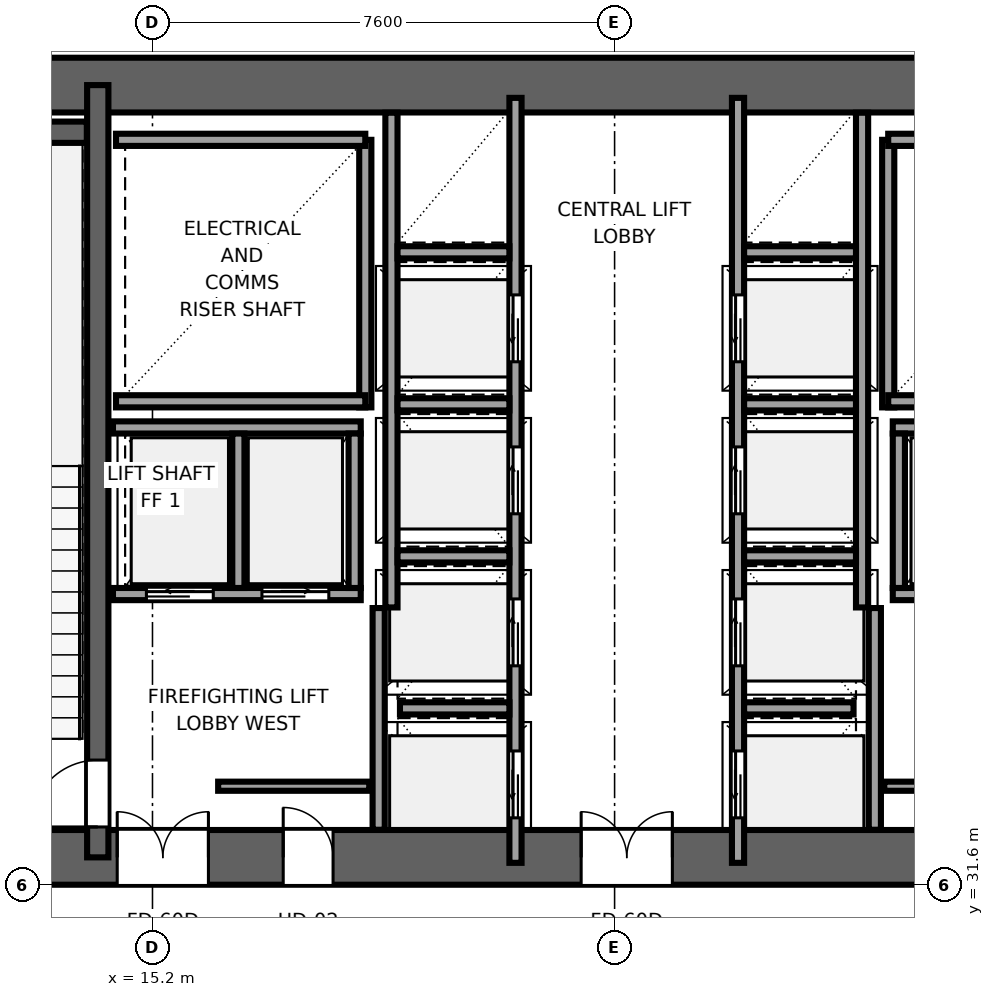
"""IFC4 building model, lengths in metres.
Left out: names, types, materials, properties, quantities, classifications, styles, units other than length and angle.
Written with IfcOpenShell. Run it as: python <this file> out.ifc"""

import sys

from ifc_helpers import new_model, si_unit, direction, frame, frame_2d, origin, place, context, subcontext, project, spatial, rectangle, extrude, source, transform, mapped, element, fill, save


model = new_model("IFC4")
c1 = context("Model", 3, precision=1e-05, world=origin(), true_north=direction((0.0, 1.0)))
c2 = subcontext(c1, "Body", "Model", "MODEL_VIEW")
j1 = project(units=[si_unit("LENGTHUNIT", "METRE"), si_unit("PLANEANGLEUNIT", "RADIAN")], contexts=[c1])
p1 = place(None, origin())
s1 = spatial("IfcSite", under=j1, at=p1, CompositionType="ELEMENT")
p2 = place(p1, origin())
s2 = spatial("IfcBuilding", under=s1, at=p2, CompositionType="ELEMENT")
p3 = place(p2, frame((0.0, 0.0, 26.8)))
s3 = spatial("IfcBuildingStorey", under=s2, at=p3, CompositionType="ELEMENT", Elevation=26.8)
p4 = place(p3, frame((9.6, 32.05, 0.0), z_axis=(0.0, 0.0, 1.0), x_axis=(1.0, 0.0, 0.0)))
e1 = element("IfcWall", 1, at=p4, inside=s3, PredefinedType="SHEAR", context=c2, shape_type="SweptSolid", body=[
    extrude(rectangle(XDim=26.8, YDim=0.9, at=frame_2d((13.4, 0.0))), origin(), (0.0, 0.0, 1.0), 5.2),
])
p5 = place(p4, frame((6.52, 0.0, 0.0), z_axis=(0.0, 0.0, 1.0), x_axis=(-1.0, 0.0, 0.0)))
e2 = element("IfcOpeningElement", 2, at=p5, cuts=e1, PredefinedType="OPENING", context=c2, shape_type="SweptSolid", body=[
    extrude(rectangle(XDim=1.5, YDim=2.04, at=frame_2d((0.75, 1.02))), frame((0.0, 0.46, 0.0), z_axis=(0.0, -1.0, 0.0), x_axis=(1.0, 0.0, 0.0)), (0.0, 0.0, 1.0), 0.92),
])
p6 = place(p4, frame((14.15, 0.0, 0.0), z_axis=(0.0, 0.0, 1.0), x_axis=(-1.0, 0.0, 0.0)))
e3 = element("IfcOpeningElement", 3, at=p6, cuts=e1, PredefinedType="OPENING", context=c2, shape_type="SweptSolid", body=[
    extrude(rectangle(XDim=1.5, YDim=2.04, at=frame_2d((0.75, 1.02))), frame((0.0, 0.46, 0.0), z_axis=(0.0, -1.0, 0.0), x_axis=(1.0, 0.0, 0.0)), (0.0, 0.0, 1.0), 0.92),
])
p7 = place(p4, frame((21.78, 0.0, 0.0), z_axis=(0.0, 0.0, 1.0), x_axis=(-1.0, 0.0, 0.0)))
e4 = element("IfcOpeningElement", 4, at=p7, cuts=e1, PredefinedType="OPENING", context=c2, shape_type="SweptSolid", body=[
    extrude(rectangle(XDim=1.5, YDim=2.04, at=frame_2d((0.75, 1.02))), frame((0.0, 0.46, 0.0), z_axis=(0.0, -1.0, 0.0), x_axis=(1.0, 0.0, 0.0)), (0.0, 0.0, 1.0), 0.92),
])
p8 = place(p4, frame((8.57, 0.0, 0.0), z_axis=(0.0, 0.0, 1.0), x_axis=(-1.0, 0.0, 0.0)))
e5 = element("IfcOpeningElement", 5, at=p8, cuts=e1, PredefinedType="OPENING", context=c2, shape_type="SweptSolid", body=[
    extrude(rectangle(XDim=0.82, YDim=2.01, at=frame_2d((0.41, 1.005))), frame((0.0, 0.46, 0.0), z_axis=(0.0, -1.0, 0.0), x_axis=(1.0, 0.0, 0.0)), (0.0, 0.0, 1.0), 0.92),
])
p9 = place(p4, frame((19.07, 0.0, 0.0), z_axis=(0.0, 0.0, 1.0), x_axis=(-1.0, 0.0, 0.0)))
e6 = element("IfcOpeningElement", 6, at=p9, cuts=e1, PredefinedType="OPENING", context=c2, shape_type="SweptSolid", body=[
    extrude(rectangle(XDim=0.82, YDim=2.01, at=frame_2d((0.41, 1.005))), frame((0.0, 0.46, 0.0), z_axis=(0.0, -1.0, 0.0), x_axis=(1.0, 0.0, 0.0)), (0.0, 0.0, 1.0), 0.92),
])
p10 = place(p3, frame((9.6, 44.75, 0.0), z_axis=(0.0, 0.0, 1.0), x_axis=(1.0, 0.0, 0.0)))
e7 = element("IfcWall", 7, at=p10, inside=s3, PredefinedType="SHEAR", context=c2, shape_type="SweptSolid", body=[
    extrude(rectangle(XDim=26.8, YDim=0.9, at=frame_2d((13.4, 0.0))), origin(), (0.0, 0.0, 1.0), 5.2),
])
p11 = place(p3, frame((14.3, 32.05, 0.0), z_axis=(0.0, 0.0, 1.0), x_axis=(0.0, 1.0, 0.0)))
e8 = element("IfcWall", 8, at=p11, inside=s3, PredefinedType="SHEAR", context=c2, shape_type="SweptSolid", body=[
    extrude(rectangle(XDim=12.7, YDim=0.35, at=frame_2d((6.35, 0.0))), origin(), (0.0, 0.0, 1.0), 5.2),
])
p12 = place(p11, frame((0.5, 0.0, 0.0)))
e9 = element("IfcOpeningElement", 9, at=p12, cuts=e8, PredefinedType="OPENING", context=c2, shape_type="SweptSolid", body=[
    extrude(rectangle(XDim=1.1, YDim=2.12, at=frame_2d((0.55, 1.06))), frame((0.0, 0.185, 0.0), z_axis=(0.0, -1.0, 0.0), x_axis=(1.0, 0.0, 0.0)), (0.0, 0.0, 1.0), 0.37),
])
p13 = place(p3, frame((10.52, 43.975, 0.0), z_axis=(0.0, 0.0, 1.0), x_axis=(1.0, 0.0, 0.0)))
e10 = element("IfcWall", 10, at=p13, inside=s3, PredefinedType="SHEAR", context=c2, shape_type="SweptSolid", body=[
    extrude(rectangle(XDim=3.6, YDim=0.35, at=frame_2d((1.8, 0.0))), origin(), (0.0, 0.0, 1.0), 5.2),
])
p14 = place(p3, frame((18.7, 39.45, 0.0), z_axis=(0.0, 0.0, 1.0), x_axis=(0.0, 1.0, 0.0)))
e11 = element("IfcWall", 11, at=p14, inside=s3, PredefinedType="SOLIDWALL", context=c2, shape_type="SweptSolid", body=[
    extrude(rectangle(XDim=4.4, YDim=0.2, at=frame_2d((2.2, 0.0))), origin(), (0.0, 0.0, 1.0), 4.94),
])
for number, where, z_axis, x_axis in (
    (12, (14.6, 39.55, 0.0), (0.0, 0.0, 1.0), (1.0, 0.0, 0.0)),
    (13, (14.6, 43.85, 0.0), (0.0, 0.0, 1.0), (1.0, 0.0, 0.0)),
):
    element("IfcWall", number, at=place(p3, frame(where, z_axis=z_axis, x_axis=x_axis)), inside=s3, PredefinedType="SOLIDWALL", context=c2, shape_type="SweptSolid", body=[
        extrude(rectangle(XDim=4.1, YDim=0.2, at=frame_2d((2.05, 0.0))), origin(), (0.0, 0.0, 1.0), 4.94),
    ])
p15 = place(p3, frame((27.3, 39.45, 0.0), z_axis=(0.0, 0.0, 1.0), x_axis=(0.0, 1.0, 0.0)))
e14 = element("IfcWall", 14, at=p15, inside=s3, PredefinedType="SOLIDWALL", context=c2, shape_type="SweptSolid", body=[
    extrude(rectangle(XDim=4.4, YDim=0.2, at=frame_2d((2.2, 0.0))), origin(), (0.0, 0.0, 1.0), 4.94),
])
for number, where, z_axis, x_axis in (
    (15, (27.3, 39.55, 0.0), (0.0, 0.0, 1.0), (1.0, 0.0, 0.0)),
    (16, (27.3, 43.85, 0.0), (0.0, 0.0, 1.0), (1.0, 0.0, 0.0)),
):
    element("IfcWall", number, at=place(p3, frame(where, z_axis=z_axis, x_axis=x_axis)), inside=s3, PredefinedType="SOLIDWALL", context=c2, shape_type="SweptSolid", body=[
        extrude(rectangle(XDim=4.1, YDim=0.2, at=frame_2d((2.05, 0.0))), origin(), (0.0, 0.0, 1.0), 4.94),
    ])
for number, where, z_axis, x_axis in (
    (17, (18.92, 32.504, 0.0), (0.0, 0.0, 1.0), (0.0, 1.0, 0.0)),
    (18, (27.08, 32.504, 0.0), (0.0, 0.0, 1.0), (0.0, 1.0, 0.0)),
):
    element("IfcWall", number, at=place(p3, frame(where, z_axis=z_axis, x_axis=x_axis)), inside=s3, PredefinedType="SOLIDWALL", context=c2, shape_type="SweptSolid", body=[
        extrude(rectangle(XDim=3.646, YDim=0.2, at=frame_2d((1.823, 0.0))), origin(), (0.0, 0.0, 1.0), 4.94),
    ])
p16 = place(p3, frame((21.17, 31.96, 0.0), z_axis=(0.0, 0.0, 1.0), x_axis=(0.0, 1.0, 0.0)))
e19 = element("IfcWall", 19, at=p16, inside=s3, PredefinedType="SOLIDWALL", context=c2, shape_type="SweptSolid", body=[
    extrude(rectangle(XDim=12.58, YDim=0.2, at=frame_2d((6.29, 0.0))), origin(), (0.0, 0.0, 1.0), 4.94),
])
p17 = place(p16, frame((0.74, 0.0, 0.0)))
e20 = element("IfcOpeningElement", 20, at=p17, cuts=e19, PredefinedType="OPENING", context=c2, shape_type="SweptSolid", body=[
    extrude(rectangle(XDim=1.1, YDim=2.12, at=frame_2d((0.55, 1.06))), frame((0.0, 0.11, 0.0), z_axis=(0.0, -1.0, 0.0), x_axis=(1.0, 0.0, 0.0)), (0.0, 0.0, 1.0), 0.22),
])
p18 = place(p16, frame((3.24, 0.0, 0.0)))
e21 = element("IfcOpeningElement", 21, at=p18, cuts=e19, PredefinedType="OPENING", context=c2, shape_type="SweptSolid", body=[
    extrude(rectangle(XDim=1.1, YDim=2.12, at=frame_2d((0.55, 1.06))), frame((0.0, 0.11, 0.0), z_axis=(0.0, -1.0, 0.0), x_axis=(1.0, 0.0, 0.0)), (0.0, 0.0, 1.0), 0.22),
])
p19 = place(p16, frame((5.74, 0.0, 0.0)))
e22 = element("IfcOpeningElement", 22, at=p19, cuts=e19, PredefinedType="OPENING", context=c2, shape_type="SweptSolid", body=[
    extrude(rectangle(XDim=1.1, YDim=2.12, at=frame_2d((0.55, 1.06))), frame((0.0, 0.11, 0.0), z_axis=(0.0, -1.0, 0.0), x_axis=(1.0, 0.0, 0.0)), (0.0, 0.0, 1.0), 0.22),
])
p20 = place(p16, frame((8.24, 0.0, 0.0)))
e23 = element("IfcOpeningElement", 23, at=p20, cuts=e19, PredefinedType="OPENING", context=c2, shape_type="SweptSolid", body=[
    extrude(rectangle(XDim=1.1, YDim=2.12, at=frame_2d((0.55, 1.06))), frame((0.0, 0.11, 0.0), z_axis=(0.0, -1.0, 0.0), x_axis=(1.0, 0.0, 0.0)), (0.0, 0.0, 1.0), 0.22),
])
p21 = place(p3, frame((19.13, 36.16, 0.0), z_axis=(0.0, 0.0, 1.0), x_axis=(0.0, 1.0, 0.0)))
e24 = element("IfcWall", 24, at=p21, inside=s3, PredefinedType="SOLIDWALL", context=c2, shape_type="SweptSolid", body=[
    extrude(rectangle(XDim=8.136, YDim=0.2, at=frame_2d((4.068, 0.0))), origin(), (0.0, 0.0, 1.0), 4.94),
])
p22 = place(p3, frame((19.27, 34.5, 0.0), z_axis=(0.0, 0.0, 1.0), x_axis=(1.0, 0.0, 0.0)))
e25 = element("IfcWall", 25, at=p22, inside=s3, PredefinedType="SOLIDWALL", context=c2, shape_type="SweptSolid", body=[
    extrude(rectangle(XDim=1.8, YDim=0.2, at=frame_2d((0.9, 0.0))), origin(), (0.0, 0.0, 1.0), 4.94),
])
for number, where, z_axis, x_axis in (
    (26, (19.23, 37.0, 0.0), (0.0, 0.0, 1.0), (1.0, 0.0, 0.0)),
    (27, (19.23, 39.5, 0.0), (0.0, 0.0, 1.0), (1.0, 0.0, 0.0)),
    (28, (19.23, 42.0, 0.0), (0.0, 0.0, 1.0), (1.0, 0.0, 0.0)),
):
    element("IfcWall", number, at=place(p3, frame(where, z_axis=z_axis, x_axis=x_axis)), inside=s3, PredefinedType="SOLIDWALL", context=c2, shape_type="SweptSolid", body=[
        extrude(rectangle(XDim=1.84, YDim=0.2, at=frame_2d((0.92, 0.0))), origin(), (0.0, 0.0, 1.0), 4.94),
    ])
p23 = place(p3, frame((27.375, 36.38, 0.0), z_axis=(0.0, 0.0, 1.0), x_axis=(1.0, 0.0, 0.0)))
e29 = element("IfcWall", 29, at=p23, inside=s3, PredefinedType="SOLIDWALL", context=c2, shape_type="SweptSolid", body=[
    extrude(rectangle(XDim=4.075, YDim=0.2, at=frame_2d((2.038, 0.0))), origin(), (0.0, 0.0, 1.0), 4.94),
])
p24 = place(p23, frame((0.525, 0.0, 0.0)))
e30 = element("IfcOpeningElement", 30, at=p24, cuts=e29, PredefinedType="OPENING", context=c2, shape_type="SweptSolid", body=[
    extrude(rectangle(XDim=1.1, YDim=2.12, at=frame_2d((0.55, 1.06))), frame((0.0, 0.11, 0.0), z_axis=(0.0, -1.0, 0.0), x_axis=(1.0, 0.0, 0.0)), (0.0, 0.0, 1.0), 0.22),
])
p25 = place(p23, frame((2.425, 0.0, 0.0)))
e31 = element("IfcOpeningElement", 31, at=p25, cuts=e29, PredefinedType="OPENING", context=c2, shape_type="SweptSolid", body=[
    extrude(rectangle(XDim=1.1, YDim=2.12, at=frame_2d((0.55, 1.06))), frame((0.0, 0.11, 0.0), z_axis=(0.0, -1.0, 0.0), x_axis=(1.0, 0.0, 0.0)), (0.0, 0.0, 1.0), 0.22),
])
p26 = place(p3, frame((27.375, 39.12, 0.0), z_axis=(0.0, 0.0, 1.0), x_axis=(1.0, 0.0, 0.0)))
e32 = element("IfcWall", 32, at=p26, inside=s3, PredefinedType="SOLIDWALL", context=c2, shape_type="SweptSolid", body=[
    extrude(rectangle(XDim=4.075, YDim=0.2, at=frame_2d((2.038, 0.0))), origin(), (0.0, 0.0, 1.0), 4.94),
])
p27 = place(p3, frame((27.475, 36.48, 0.0), z_axis=(0.0, 0.0, 1.0), x_axis=(0.0, 1.0, 0.0)))
e33 = element("IfcWall", 33, at=p27, inside=s3, PredefinedType="SOLIDWALL", context=c2, shape_type="SweptSolid", body=[
    extrude(rectangle(XDim=2.54, YDim=0.2, at=frame_2d((1.27, 0.0))), origin(), (0.0, 0.0, 1.0), 4.94),
])
p28 = place(p3, frame((14.55, 36.38, 0.0), z_axis=(0.0, 0.0, 1.0), x_axis=(1.0, 0.0, 0.0)))
e34 = element("IfcWall", 34, at=p28, inside=s3, PredefinedType="SOLIDWALL", context=c2, shape_type="SweptSolid", body=[
    extrude(rectangle(XDim=4.075, YDim=0.2, at=frame_2d((2.038, 0.0))), origin(), (0.0, 0.0, 1.0), 4.94),
])
p29 = place(p28, frame((0.55, 0.0, 0.0)))
e35 = element("IfcOpeningElement", 35, at=p29, cuts=e34, PredefinedType="OPENING", context=c2, shape_type="SweptSolid", body=[
    extrude(rectangle(XDim=1.1, YDim=2.12, at=frame_2d((0.55, 1.06))), frame((0.0, 0.11, 0.0), z_axis=(0.0, -1.0, 0.0), x_axis=(1.0, 0.0, 0.0)), (0.0, 0.0, 1.0), 0.22),
])
p30 = place(p28, frame((2.45, 0.0, 0.0)))
e36 = element("IfcOpeningElement", 36, at=p30, cuts=e34, PredefinedType="OPENING", context=c2, shape_type="SweptSolid", body=[
    extrude(rectangle(XDim=1.1, YDim=2.12, at=frame_2d((0.55, 1.06))), frame((0.0, 0.11, 0.0), z_axis=(0.0, -1.0, 0.0), x_axis=(1.0, 0.0, 0.0)), (0.0, 0.0, 1.0), 0.22),
])
p31 = place(p3, frame((14.55, 39.12, 0.0), z_axis=(0.0, 0.0, 1.0), x_axis=(1.0, 0.0, 0.0)))
e37 = element("IfcWall", 37, at=p31, inside=s3, PredefinedType="SOLIDWALL", context=c2, shape_type="SweptSolid", body=[
    extrude(rectangle(XDim=4.075, YDim=0.2, at=frame_2d((2.038, 0.0))), origin(), (0.0, 0.0, 1.0), 4.94),
])
for number, where, z_axis, x_axis in (
    (38, (18.525, 36.48, 0.0), (0.0, 0.0, 1.0), (0.0, 1.0, 0.0)),
    (39, (16.613, 36.48, 0.0), (0.0, 0.0, 1.0), (0.0, 1.0, 0.0)),
):
    element("IfcWall", number, at=place(p3, frame(where, z_axis=z_axis, x_axis=x_axis)), inside=s3, PredefinedType="SOLIDWALL", context=c2, shape_type="SweptSolid", body=[
        extrude(rectangle(XDim=2.54, YDim=0.2, at=frame_2d((1.27, 0.0))), origin(), (0.0, 0.0, 1.0), 4.94),
    ])
p32 = place(p3, frame((24.83, 31.96, 0.0), z_axis=(0.0, 0.0, 1.0), x_axis=(0.0, 1.0, 0.0)))
e40 = element("IfcWall", 40, at=p32, inside=s3, PredefinedType="SOLIDWALL", context=c2, shape_type="SweptSolid", body=[
    extrude(rectangle(XDim=12.58, YDim=0.2, at=frame_2d((6.29, 0.0))), origin(), (0.0, 0.0, 1.0), 4.94),
])
p33 = place(p32, frame((0.74, 0.0, 0.0)))
e41 = element("IfcOpeningElement", 41, at=p33, cuts=e40, PredefinedType="OPENING", context=c2, shape_type="SweptSolid", body=[
    extrude(rectangle(XDim=1.1, YDim=2.12, at=frame_2d((0.55, 1.06))), frame((0.0, 0.11, 0.0), z_axis=(0.0, -1.0, 0.0), x_axis=(1.0, 0.0, 0.0)), (0.0, 0.0, 1.0), 0.22),
])
p34 = place(p32, frame((3.24, 0.0, 0.0)))
e42 = element("IfcOpeningElement", 42, at=p34, cuts=e40, PredefinedType="OPENING", context=c2, shape_type="SweptSolid", body=[
    extrude(rectangle(XDim=1.1, YDim=2.12, at=frame_2d((0.55, 1.06))), frame((0.0, 0.11, 0.0), z_axis=(0.0, -1.0, 0.0), x_axis=(1.0, 0.0, 0.0)), (0.0, 0.0, 1.0), 0.22),
])
p35 = place(p32, frame((5.74, 0.0, 0.0)))
e43 = element("IfcOpeningElement", 43, at=p35, cuts=e40, PredefinedType="OPENING", context=c2, shape_type="SweptSolid", body=[
    extrude(rectangle(XDim=1.1, YDim=2.12, at=frame_2d((0.55, 1.06))), frame((0.0, 0.11, 0.0), z_axis=(0.0, -1.0, 0.0), x_axis=(1.0, 0.0, 0.0)), (0.0, 0.0, 1.0), 0.22),
])
p36 = place(p32, frame((8.24, 0.0, 0.0)))
e44 = element("IfcOpeningElement", 44, at=p36, cuts=e40, PredefinedType="OPENING", context=c2, shape_type="SweptSolid", body=[
    extrude(rectangle(XDim=1.1, YDim=2.12, at=frame_2d((0.55, 1.06))), frame((0.0, 0.11, 0.0), z_axis=(0.0, -1.0, 0.0), x_axis=(1.0, 0.0, 0.0)), (0.0, 0.0, 1.0), 0.22),
])
p37 = place(p3, frame((26.87, 36.16, 0.0), z_axis=(0.0, 0.0, 1.0), x_axis=(0.0, 1.0, 0.0)))
e45 = element("IfcWall", 45, at=p37, inside=s3, PredefinedType="SOLIDWALL", context=c2, shape_type="SweptSolid", body=[
    extrude(rectangle(XDim=8.136, YDim=0.2, at=frame_2d((4.068, 0.0))), origin(), (0.0, 0.0, 1.0), 4.94),
])
p38 = place(p3, frame((24.93, 34.5, 0.0), z_axis=(0.0, 0.0, 1.0), x_axis=(1.0, 0.0, 0.0)))
e46 = element("IfcWall", 46, at=p38, inside=s3, PredefinedType="SOLIDWALL", context=c2, shape_type="SweptSolid", body=[
    extrude(rectangle(XDim=1.8, YDim=0.2, at=frame_2d((0.9, 0.0))), origin(), (0.0, 0.0, 1.0), 4.94),
])
for number, where, z_axis, x_axis in (
    (47, (24.93, 37.0, 0.0), (0.0, 0.0, 1.0), (1.0, 0.0, 0.0)),
    (48, (24.93, 39.5, 0.0), (0.0, 0.0, 1.0), (1.0, 0.0, 0.0)),
    (49, (24.93, 42.0, 0.0), (0.0, 0.0, 1.0), (1.0, 0.0, 0.0)),
):
    element("IfcWall", number, at=place(p3, frame(where, z_axis=z_axis, x_axis=x_axis)), inside=s3, PredefinedType="SOLIDWALL", context=c2, shape_type="SweptSolid", body=[
        extrude(rectangle(XDim=1.84, YDim=0.2, at=frame_2d((0.92, 0.0))), origin(), (0.0, 0.0, 1.0), 4.94),
    ])
for number, where, z_axis, x_axis in (
    (50, (16.28, 33.22, 0.0), (0.0, 0.0, 1.0), (1.0, 0.0, 0.0)),
    (51, (27.235, 33.22, 0.0), (0.0, 0.0, 1.0), (1.0, 0.0, 0.0)),
):
    element("IfcWall", number, at=place(p3, frame(where, z_axis=z_axis, x_axis=x_axis)), inside=s3, PredefinedType="PARTITIONING", context=c2, shape_type="SweptSolid", body=[
        extrude(rectangle(XDim=2.485, YDim=0.15, at=frame_2d((1.242, 0.0))), origin(), (0.0, 0.0, 1.0), 4.94),
    ])
m1 = source(origin(), c2, "Body", "SweptSolid", [
    extrude(rectangle(XDim=1.1, YDim=2.12, at=frame_2d((0.55, 1.06))), frame((0.0, 0.025, 0.0), z_axis=(0.0, -1.0, 0.0), x_axis=(1.0, 0.0, 0.0)), (0.0, 0.0, 1.0), 0.05),
])
p39 = place(p12, origin())
e52 = element("IfcDoor", 52, at=p39, inside=s3, OperationType="SINGLE_SWING_LEFT", PredefinedType="DOOR", context=c2, shape_type="MappedRepresentation", body=[
    mapped(m1, transform((0.0, 0.0, 0.0), x_axis=(1.0, 0.0, 0.0), y_axis=(0.0, 1.0, 0.0), z_axis=(0.0, 0.0, 1.0), scale=1.0)),
])
fill(e9, e52)
m2 = source(origin(), c2, "Body", "SweptSolid", [
    extrude(rectangle(XDim=1.5, YDim=2.04, at=frame_2d((0.75, 1.02))), frame((0.0, 0.025, 0.0), z_axis=(0.0, -1.0, 0.0), x_axis=(1.0, 0.0, 0.0)), (0.0, 0.0, 1.0), 0.05),
])
p40 = place(p5, origin())
e53 = element("IfcDoor", 53, at=p40, inside=s3, OperationType="DOUBLE_DOOR_SINGLE_SWING", PredefinedType="DOOR", context=c2, shape_type="MappedRepresentation", body=[
    mapped(m2, transform((0.0, 0.0, 0.0), x_axis=(1.0, 0.0, 0.0), y_axis=(0.0, 1.0, 0.0), z_axis=(0.0, 0.0, 1.0), scale=1.0)),
])
fill(e2, e53)
p41 = place(p6, origin())
e54 = element("IfcDoor", 54, at=p41, inside=s3, OperationType="DOUBLE_DOOR_SINGLE_SWING", PredefinedType="DOOR", context=c2, shape_type="MappedRepresentation", body=[
    mapped(m2, transform((0.0, 0.0, 0.0), x_axis=(1.0, 0.0, 0.0), y_axis=(0.0, 1.0, 0.0), z_axis=(0.0, 0.0, 1.0), scale=1.0)),
])
fill(e3, e54)
m3 = source(origin(), c2, "Body", "SweptSolid", [
    extrude(rectangle(XDim=0.82, YDim=2.01, at=frame_2d((0.41, 1.005))), frame((0.0, 0.025, 0.0), z_axis=(0.0, -1.0, 0.0), x_axis=(1.0, 0.0, 0.0)), (0.0, 0.0, 1.0), 0.05),
])
p42 = place(p8, origin())
e55 = element("IfcDoor", 55, at=p42, inside=s3, OperationType="SINGLE_SWING_LEFT", PredefinedType="DOOR", context=c2, shape_type="MappedRepresentation", body=[
    mapped(m3, transform((0.0, 0.0, 0.0), x_axis=(1.0, 0.0, 0.0), y_axis=(0.0, 1.0, 0.0), z_axis=(0.0, 0.0, 1.0), scale=1.0)),
])
fill(e5, e55)
m4 = source(origin(), c2, "Body", "SweptSolid", [
    extrude(rectangle(XDim=1.1, YDim=2.12, at=frame_2d((0.55, 1.06))), frame((0.0, 0.025, 0.0), z_axis=(0.0, -1.0, 0.0), x_axis=(1.0, 0.0, 0.0)), (0.0, 0.0, 1.0), 0.05),
])
p43 = place(p17, origin())
e56 = element("IfcDoor", 56, at=p43, inside=s3, OperationType="SLIDING_TO_LEFT", PredefinedType="DOOR", context=c2, shape_type="MappedRepresentation", body=[
    mapped(m4, transform((0.0, 0.0, 0.0), x_axis=(1.0, 0.0, 0.0), y_axis=(0.0, 1.0, 0.0), z_axis=(0.0, 0.0, 1.0), scale=1.0)),
])
fill(e20, e56)
p44 = place(p18, origin())
e57 = element("IfcDoor", 57, at=p44, inside=s3, OperationType="SLIDING_TO_RIGHT", PredefinedType="DOOR", context=c2, shape_type="MappedRepresentation", body=[
    mapped(m4, transform((0.0, 0.0, 0.0), x_axis=(1.0, 0.0, 0.0), y_axis=(0.0, 1.0, 0.0), z_axis=(0.0, 0.0, 1.0), scale=1.0)),
])
fill(e21, e57)
p45 = place(p19, origin())
e58 = element("IfcDoor", 58, at=p45, inside=s3, OperationType="SLIDING_TO_RIGHT", PredefinedType="DOOR", context=c2, shape_type="MappedRepresentation", body=[
    mapped(m4, transform((0.0, 0.0, 0.0), x_axis=(1.0, 0.0, 0.0), y_axis=(0.0, 1.0, 0.0), z_axis=(0.0, 0.0, 1.0), scale=1.0)),
])
fill(e22, e58)
p46 = place(p20, origin())
e59 = element("IfcDoor", 59, at=p46, inside=s3, OperationType="SLIDING_TO_LEFT", PredefinedType="DOOR", context=c2, shape_type="MappedRepresentation", body=[
    mapped(m4, transform((0.0, 0.0, 0.0), x_axis=(1.0, 0.0, 0.0), y_axis=(0.0, 1.0, 0.0), z_axis=(0.0, 0.0, 1.0), scale=1.0)),
])
fill(e23, e59)
p47 = place(p29, origin())
e60 = element("IfcDoor", 60, at=p47, inside=s3, OperationType="SLIDING_TO_LEFT", PredefinedType="DOOR", context=c2, shape_type="MappedRepresentation", body=[
    mapped(m4, transform((0.0, 0.0, 0.0), x_axis=(1.0, 0.0, 0.0), y_axis=(0.0, 1.0, 0.0), z_axis=(0.0, 0.0, 1.0), scale=1.0)),
])
fill(e35, e60)
p48 = place(p30, origin())
e61 = element("IfcDoor", 61, at=p48, inside=s3, OperationType="SLIDING_TO_RIGHT", PredefinedType="DOOR", context=c2, shape_type="MappedRepresentation", body=[
    mapped(m4, transform((0.0, 0.0, 0.0), x_axis=(1.0, 0.0, 0.0), y_axis=(0.0, 1.0, 0.0), z_axis=(0.0, 0.0, 1.0), scale=1.0)),
])
fill(e36, e61)
p49 = place(p33, origin())
e62 = element("IfcDoor", 62, at=p49, inside=s3, OperationType="SLIDING_TO_LEFT", PredefinedType="DOOR", context=c2, shape_type="MappedRepresentation", body=[
    mapped(m4, transform((0.0, 0.0, 0.0), x_axis=(1.0, 0.0, 0.0), y_axis=(0.0, 1.0, 0.0), z_axis=(0.0, 0.0, 1.0), scale=1.0)),
])
fill(e41, e62)
p50 = place(p34, origin())
e63 = element("IfcDoor", 63, at=p50, inside=s3, OperationType="SLIDING_TO_RIGHT", PredefinedType="DOOR", context=c2, shape_type="MappedRepresentation", body=[
    mapped(m4, transform((0.0, 0.0, 0.0), x_axis=(1.0, 0.0, 0.0), y_axis=(0.0, 1.0, 0.0), z_axis=(0.0, 0.0, 1.0), scale=1.0)),
])
fill(e42, e63)
p51 = place(p35, origin())
e64 = element("IfcDoor", 64, at=p51, inside=s3, OperationType="SLIDING_TO_RIGHT", PredefinedType="DOOR", context=c2, shape_type="MappedRepresentation", body=[
    mapped(m4, transform((0.0, 0.0, 0.0), x_axis=(1.0, 0.0, 0.0), y_axis=(0.0, 1.0, 0.0), z_axis=(0.0, 0.0, 1.0), scale=1.0)),
])
fill(e43, e64)
p52 = place(p36, origin())
e65 = element("IfcDoor", 65, at=p52, inside=s3, OperationType="SLIDING_TO_LEFT", PredefinedType="DOOR", context=c2, shape_type="MappedRepresentation", body=[
    mapped(m4, transform((0.0, 0.0, 0.0), x_axis=(1.0, 0.0, 0.0), y_axis=(0.0, 1.0, 0.0), z_axis=(0.0, 0.0, 1.0), scale=1.0)),
])
fill(e44, e65)
save(model, sys.argv[1])
